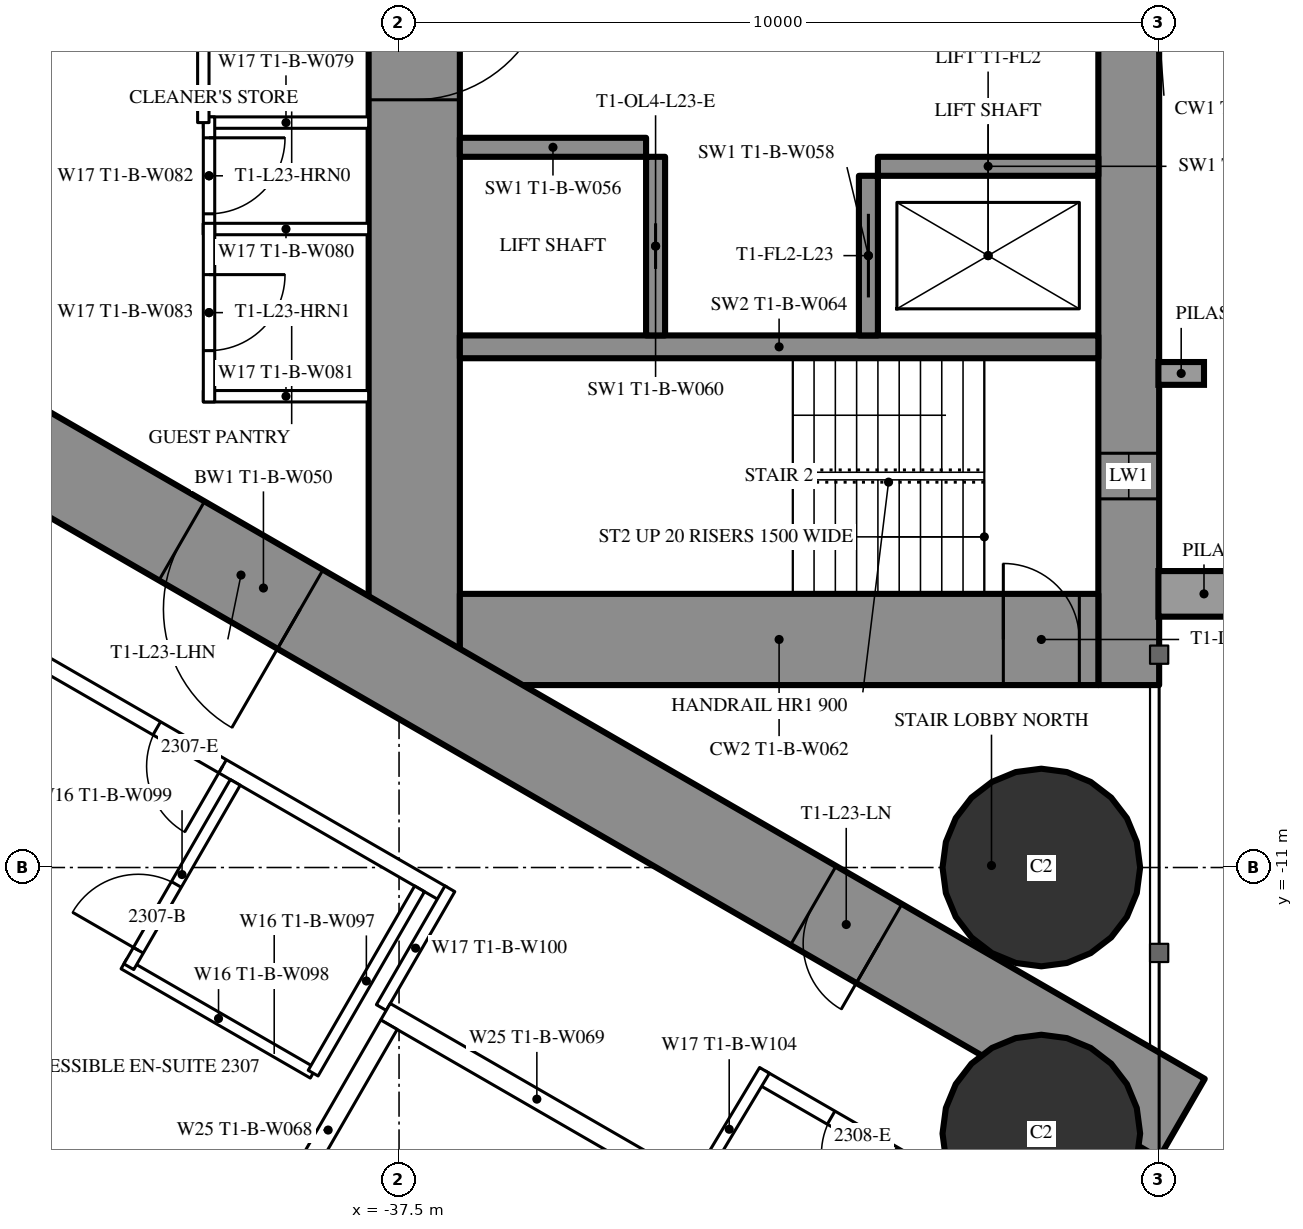
"""IFC4 building model, lengths in metres.
Left out: names, types, materials, properties, quantities, classifications, styles, units other than length and angle.
Written with IfcOpenShell. Run it as: python <this file> out.ifc"""

import sys

from ifc_helpers import new_model, si_unit, direction, frame, frame_2d, origin, origin_2d, place, context, subcontext, project, spatial, rectangle, hollow_circle, extrude, element, fill, save


model = new_model("IFC4")
c1 = context("Model", 3, precision=1e-05, world=origin(), true_north=direction((0.0, 1.0)))
c2 = subcontext(c1, "Body", "Model", "MODEL_VIEW")
j1 = project(units=[si_unit("LENGTHUNIT", "METRE"), si_unit("PLANEANGLEUNIT", "RADIAN")], contexts=[c1])
p1 = place(None, origin())
s1 = spatial("IfcSite", under=j1, at=p1, CompositionType="ELEMENT")
p2 = place(p1, origin())
s2 = spatial("IfcBuilding", under=s1, at=p2, CompositionType="ELEMENT")
p3 = place(p2, frame((0.0, 0.0, 90.6)))
s3 = spatial("IfcBuildingStorey", under=s2, at=p3, CompositionType="ELEMENT", Elevation=90.6)
for number, where, z_axis, x_axis in (
    (1, (-29.05, -11.0, 0.0), (0.0, 0.0, 1.0), (1.0, 0.0, 0.0)),
    (2, (-29.05, -14.5, 0.0), (0.0, 0.0, 1.0), (1.0, 0.0, 0.0)),
):
    element("IfcColumn", number, at=place(p3, frame(where, z_axis=z_axis, x_axis=x_axis)), inside=s3, PredefinedType="COLUMN", context=c2, shape_type="SweptSolid", body=[
        extrude(hollow_circle(Radius=1.3, WallThickness=0.1, at=origin_2d()), origin(), (0.0, 0.0, 1.0), 3.5),
    ])
p4 = place(p3, frame((-27.9, 8.6, 0.0), z_axis=(0.0, 0.0, 1.0), x_axis=(0.0, -1.0, 0.0)))
e3 = element("IfcWall", 3, at=p4, inside=s3, PredefinedType="SHEAR", context=c2, shape_type="SweptSolid", body=[
    extrude(rectangle(XDim=17.2, YDim=0.8, at=frame_2d((8.6, 0.0))), origin(), (0.0, 0.0, 1.0), 3.5),
])
p5 = place(p4, frame((2.45, 0.0, 0.6)))
e4 = element("IfcOpeningElement", 4, at=p5, cuts=e3, PredefinedType="OPENING", context=c2, shape_type="SweptSolid", body=[
    extrude(rectangle(XDim=0.6, YDim=2.1, at=frame_2d((0.3, 1.05))), frame((0.0, 0.41, 0.0), z_axis=(0.0, -1.0, 0.0), x_axis=(1.0, 0.0, 0.0)), (0.0, 0.0, 1.0), 0.82),
])
p6 = place(p4, frame((14.15, 0.0, 0.6)))
e5 = element("IfcOpeningElement", 5, at=p6, cuts=e3, PredefinedType="OPENING", context=c2, shape_type="SweptSolid", body=[
    extrude(rectangle(XDim=0.6, YDim=2.1, at=frame_2d((0.3, 1.05))), frame((0.0, 0.41, 0.0), z_axis=(0.0, -1.0, 0.0), x_axis=(1.0, 0.0, 0.0)), (0.0, 0.0, 1.0), 0.82),
])
p7 = place(p3, frame((-37.3, 8.6, 0.0), z_axis=(0.0, 0.0, 1.0), x_axis=(0.0, -1.0, 0.0)))
e6 = element("IfcWall", 6, at=p7, inside=s3, PredefinedType="SHEAR", context=c2, shape_type="SweptSolid", body=[
    extrude(rectangle(XDim=17.2, YDim=1.2, at=frame_2d((8.6, 0.0))), origin(), (0.0, 0.0, 1.0), 3.5),
])
p8 = place(p7, frame((7.7, 0.0, 0.0)))
e7 = element("IfcOpeningElement", 7, at=p8, cuts=e6, PredefinedType="OPENING", context=c2, shape_type="SweptSolid", body=[
    extrude(rectangle(XDim=1.8, YDim=2.2, at=frame_2d((0.9, 1.1))), frame((0.0, 0.61, 0.0), z_axis=(0.0, -1.0, 0.0), x_axis=(1.0, 0.0, 0.0)), (0.0, 0.0, 1.0), 1.22),
])
p9 = place(p3, frame((-28.3, -8.0, 0.0), z_axis=(0.0, 0.0, 1.0), x_axis=(-1.0, 0.0, 0.0)))
e8 = element("IfcWall", 8, at=p9, inside=s3, PredefinedType="SHEAR", context=c2, shape_type="SweptSolid", body=[
    extrude(rectangle(XDim=8.4, YDim=1.2, at=frame_2d((4.2, 0.0))), origin(), (0.0, 0.0, 1.0), 3.5),
])
p10 = place(p9, frame((0.25, 0.0, 0.0)))
e9 = element("IfcOpeningElement", 9, at=p10, cuts=e8, PredefinedType="OPENING", context=c2, shape_type="SweptSolid", body=[
    extrude(rectangle(XDim=1.0, YDim=2.2, at=frame_2d((0.5, 1.1))), frame((0.0, 0.61, 0.0), z_axis=(0.0, -1.0, 0.0), x_axis=(1.0, 0.0, 0.0)), (0.0, 0.0, 1.0), 1.22),
])
p11 = place(p3, frame((-28.3, -4.15, 0.0), z_axis=(0.0, 0.0, 1.0), x_axis=(-1.0, 0.0, 0.0)))
e10 = element("IfcWall", 10, at=p11, inside=s3, PredefinedType="SHEAR", context=c2, shape_type="SweptSolid", body=[
    extrude(rectangle(XDim=8.4, YDim=0.3, at=frame_2d((4.2, 0.0))), origin(), (0.0, 0.0, 1.0), 3.5),
])
p12 = place(p3, frame((-31.325, -1.9, 0.0), z_axis=(0.0, 0.0, 1.0), x_axis=(0.0, -1.0, 0.0)))
e11 = element("IfcWall", 11, at=p12, inside=s3, PredefinedType="SHEAR", context=c2, shape_type="SweptSolid", body=[
    extrude(rectangle(XDim=2.1, YDim=0.25, at=frame_2d((1.05, 0.0))), origin(), (0.0, 0.0, 1.0), 3.5),
])
p13 = place(p12, frame((0.5, 0.0, 0.0)))
e12 = element("IfcOpeningElement", 12, at=p13, cuts=e11, PredefinedType="OPENING", context=c2, shape_type="SweptSolid", body=[
    extrude(rectangle(XDim=1.1, YDim=2.2, at=frame_2d((0.55, 1.1))), frame((0.0, 0.135, 0.0), z_axis=(0.0, -1.0, 0.0), x_axis=(1.0, 0.0, 0.0)), (0.0, 0.0, 1.0), 0.27),
])
p14 = place(p3, frame((-34.125, -1.65, 0.0), z_axis=(0.0, 0.0, 1.0), x_axis=(0.0, -1.0, 0.0)))
e13 = element("IfcWall", 13, at=p14, inside=s3, PredefinedType="SHEAR", context=c2, shape_type="SweptSolid", body=[
    extrude(rectangle(XDim=2.35, YDim=0.25, at=frame_2d((1.175, 0.0))), origin(), (0.0, 0.0, 1.0), 3.5),
])
p15 = place(p14, frame((0.875, 0.0, 0.0)))
e14 = element("IfcOpeningElement", 14, at=p15, cuts=e13, PredefinedType="OPENING", context=c2, shape_type="SweptSolid", body=[
    extrude(rectangle(XDim=0.6, YDim=2.0, at=frame_2d((0.3, 1.0))), frame((0.0, 0.135, 0.0), z_axis=(0.0, -1.0, 0.0), x_axis=(1.0, 0.0, 0.0)), (0.0, 0.0, 1.0), 0.27),
])
p16 = place(p3, frame((-28.3, -1.775, 0.0), z_axis=(0.0, 0.0, 1.0), x_axis=(-1.0, 0.0, 0.0)))
e15 = element("IfcWall", 15, at=p16, inside=s3, PredefinedType="SHEAR", context=c2, shape_type="SweptSolid", body=[
    extrude(rectangle(XDim=2.9, YDim=0.25, at=frame_2d((1.45, 0.0))), origin(), (0.0, 0.0, 1.0), 3.5),
])
p17 = place(p3, frame((-34.25, -1.525, 0.0), z_axis=(0.0, 0.0, 1.0), x_axis=(-1.0, 0.0, 0.0)))
e16 = element("IfcWall", 16, at=p17, inside=s3, PredefinedType="SHEAR", context=c2, shape_type="SweptSolid", body=[
    extrude(rectangle(XDim=2.45, YDim=0.25, at=frame_2d((1.225, 0.0))), origin(), (0.0, 0.0, 1.0), 3.5),
])
p18 = place(p3, frame((-27.2, 14.3, 0.0), z_axis=(0.0, 0.0, 1.0), x_axis=(-0.866026593062, -0.499997940104, 0.0)))
e17 = element("IfcWall", 17, at=p18, inside=s3, PredefinedType="SHEAR", context=c2, shape_type="SweptSolid", body=[
    extrude(rectangle(XDim=28.946, YDim=1.2, at=frame_2d((14.473, 0.0))), origin(), (0.0, 0.0, 1.0), 3.5),
])
p19 = place(p18, frame((4.6, 0.0, 0.0)))
e18 = element("IfcOpeningElement", 18, at=p19, cuts=e17, PredefinedType="OPENING", context=c2, shape_type="SweptSolid", body=[
    extrude(rectangle(XDim=1.0, YDim=2.2, at=frame_2d((0.5, 1.1))), frame((0.0, 0.61, 0.0), z_axis=(0.0, -1.0, 0.0), x_axis=(1.0, 0.0, 0.0)), (0.0, 0.0, 1.0), 1.22),
])
p20 = place(p18, frame((13.395, 0.0, 0.0)))
e19 = element("IfcOpeningElement", 19, at=p20, cuts=e17, PredefinedType="OPENING", context=c2, shape_type="SweptSolid", body=[
    extrude(rectangle(XDim=1.8, YDim=2.2, at=frame_2d((0.9, 1.1))), frame((0.0, 0.61, 0.0), z_axis=(0.0, -1.0, 0.0), x_axis=(1.0, 0.0, 0.0)), (0.0, 0.0, 1.0), 1.22),
])
p21 = place(p3, frame((-27.2, -14.3, 0.0), z_axis=(0.0, 0.0, 1.0), x_axis=(-0.866024021859, 0.500002393557, 0.0)))
e20 = element("IfcWall", 20, at=p21, inside=s3, PredefinedType="SHEAR", context=c2, shape_type="SweptSolid", body=[
    extrude(rectangle(XDim=27.907, YDim=1.2, at=frame_2d((13.954, 0.0))), origin(), (0.0, 0.0, 1.0), 3.5),
])
p22 = place(p21, frame((4.6, 0.0, 0.0)))
e21 = element("IfcOpeningElement", 21, at=p22, cuts=e20, PredefinedType="OPENING", context=c2, shape_type="SweptSolid", body=[
    extrude(rectangle(XDim=1.0, YDim=2.2, at=frame_2d((0.5, 1.1))), frame((0.0, 0.61, 0.0), z_axis=(0.0, -1.0, 0.0), x_axis=(1.0, 0.0, 0.0)), (0.0, 0.0, 1.0), 1.22),
])
p23 = place(p21, frame((13.395, 0.0, 0.0)))
e22 = element("IfcOpeningElement", 22, at=p23, cuts=e20, PredefinedType="OPENING", context=c2, shape_type="SweptSolid", body=[
    extrude(rectangle(XDim=1.8, YDim=2.2, at=frame_2d((0.9, 1.1))), frame((0.0, 0.61, 0.0), z_axis=(0.0, -1.0, 0.0), x_axis=(1.0, 0.0, 0.0)), (0.0, 0.0, 1.0), 1.22),
])
p24 = place(p3, frame((-27.572, -16.741, 0.0), z_axis=(0.0, 0.0, 1.0), x_axis=(-0.866024464444, 0.500001626982, 0.0)))
e23 = element("IfcWall", 23, at=p24, inside=s3, PredefinedType="PARTITIONING", context=c2, shape_type="SweptSolid", body=[
    extrude(rectangle(XDim=5.955, YDim=0.2, at=frame_2d((2.978, 0.0))), origin(), (0.0, 0.0, 1.0), 3.25),
])
p25 = place(p24, frame((3.95, 0.0, 0.0)))
e24 = element("IfcOpeningElement", 24, at=p25, cuts=e23, PredefinedType="OPENING", context=c2, shape_type="SweptSolid", body=[
    extrude(rectangle(XDim=0.95, YDim=2.2, at=frame_2d((0.475, 1.1))), frame((0.0, 0.11, 0.0), z_axis=(0.0, -1.0, 0.0), x_axis=(1.0, 0.0, 0.0)), (0.0, 0.0, 1.0), 0.22),
])
p26 = place(p3, frame((-36.92, -11.344, 0.0), z_axis=(0.0, 0.0, 1.0), x_axis=(-0.866028313256, 0.499994960614, 0.0)))
e25 = element("IfcWall", 25, at=p26, inside=s3, PredefinedType="PARTITIONING", context=c2, shape_type="SweptSolid", body=[
    extrude(rectangle(XDim=22.568, YDim=0.2, at=frame_2d((11.284, 0.0))), origin(), (0.0, 0.0, 1.0), 3.25),
])
p27 = place(p26, frame((14.481, 0.0, 0.0)))
e26 = element("IfcOpeningElement", 26, at=p27, cuts=e25, PredefinedType="OPENING", context=c2, shape_type="SweptSolid", body=[
    extrude(rectangle(XDim=0.95, YDim=2.2, at=frame_2d((0.475, 1.1))), frame((0.0, 0.11, 0.0), z_axis=(0.0, -1.0, 0.0), x_axis=(1.0, 0.0, 0.0)), (0.0, 0.0, 1.0), 0.22),
])
p28 = place(p26, frame((3.35, 0.0, 0.0)))
e27 = element("IfcOpeningElement", 27, at=p28, cuts=e25, PredefinedType="OPENING", context=c2, shape_type="SweptSolid", body=[
    extrude(rectangle(XDim=1.0, YDim=2.2, at=frame_2d((0.5, 1.1))), frame((0.0, 0.11, 0.0), z_axis=(0.0, -1.0, 0.0), x_axis=(1.0, 0.0, 0.0)), (0.0, 0.0, 1.0), 0.22),
])
p29 = place(p3, frame((-36.831, -11.28, 0.0), z_axis=(0.0, 0.0, 1.0), x_axis=(-0.499937177781, -0.866061671171, 0.0)))
e28 = element("IfcWall", 28, at=p29, inside=s3, PredefinedType="PARTITIONING", context=c2, shape_type="SweptSolid", body=[
    extrude(rectangle(XDim=1.804, YDim=0.15, at=frame_2d((0.902, 0.0))), origin(), (0.0, 0.0, 1.0), 3.25),
])
p30 = place(p3, frame((-33.621, -15.218, 0.0), z_axis=(0.0, 0.0, 1.0), x_axis=(0.514336634837, 0.857588377991, 0.0)))
e29 = element("IfcWall", 29, at=p30, inside=s3, PredefinedType="PARTITIONING", context=c2, shape_type="SweptSolid", body=[
    extrude(rectangle(XDim=1.805, YDim=0.15, at=frame_2d((0.903, 0.0))), origin(), (0.0, 0.0, 1.0), 3.25),
])
p31 = place(p3, frame((-38.63, -13.705, 0.0), z_axis=(0.0, 0.0, 1.0), x_axis=(-0.866018712932, 0.500011588718, 0.0)))
e30 = element("IfcWall", 30, at=p31, inside=s3, PredefinedType="PARTITIONING", context=c2, shape_type="SweptSolid", body=[
    extrude(rectangle(XDim=2.875, YDim=0.15, at=frame_2d((1.438, 0.0))), origin(), (0.0, 0.0, 1.0), 3.25),
])
p32 = place(p3, frame((-39.655, -9.88, 0.0), z_axis=(0.0, 0.0, 1.0), x_axis=(-0.500049511043, -0.865996816683, 0.0)))
e31 = element("IfcWall", 31, at=p32, inside=s3, PredefinedType="PARTITIONING", context=c2, shape_type="SweptSolid", body=[
    extrude(rectangle(XDim=2.8, YDim=0.15, at=frame_2d((1.4, 0.0))), origin(), (0.0, 0.0, 1.0), 3.25),
])
p33 = place(p32, frame((1.55, 0.0, 0.0)))
e32 = element("IfcOpeningElement", 32, at=p33, cuts=e31, PredefinedType="OPENING", context=c2, shape_type="SweptSolid", body=[
    extrude(rectangle(XDim=1.0, YDim=2.2, at=frame_2d((0.5, 1.1))), frame((0.0, 0.085, 0.0), z_axis=(0.0, -1.0, 0.0), x_axis=(1.0, 0.0, 0.0)), (0.0, 0.0, 1.0), 0.17),
])
p34 = place(p3, frame((-37.23, -11.281, 0.0), z_axis=(0.0, 0.0, 1.0), x_axis=(-0.500049511043, -0.865996816683, 0.0)))
e33 = element("IfcWall", 33, at=p34, inside=s3, PredefinedType="PARTITIONING", context=c2, shape_type="SweptSolid", body=[
    extrude(rectangle(XDim=2.8, YDim=0.15, at=frame_2d((1.4, 0.0))), origin(), (0.0, 0.0, 1.0), 3.25),
])
for number, where, z_axis, x_axis in (
    (34, (-37.9, -1.2, 0.0), (0.0, 0.0, 1.0), (-1.0, 0.0, 0.0)),
    (35, (-37.9, -2.6, 0.0), (0.0, 0.0, 1.0), (-1.0, 0.0, 0.0)),
    (36, (-37.9, -4.8, 0.0), (0.0, 0.0, 1.0), (-1.0, 0.0, 0.0)),
):
    element("IfcWall", number, at=place(p3, frame(where, z_axis=z_axis, x_axis=x_axis)), inside=s3, PredefinedType="PARTITIONING", context=c2, shape_type="SweptSolid", body=[
        extrude(rectangle(XDim=2.175, YDim=0.15, at=frame_2d((1.087, 0.0))), origin(), (0.0, 0.0, 1.0), 3.25),
    ])
p35 = place(p3, frame((-40.0, -1.125, 0.0), z_axis=(0.0, 0.0, 1.0), x_axis=(0.0, -1.0, 0.0)))
e37 = element("IfcWall", 37, at=p35, inside=s3, PredefinedType="PARTITIONING", context=c2, shape_type="SweptSolid", body=[
    extrude(rectangle(XDim=1.55, YDim=0.15, at=frame_2d((0.775, 0.0))), origin(), (0.0, 0.0, 1.0), 3.25),
])
p36 = place(p35, frame((0.275, 0.0, 0.0)))
e38 = element("IfcOpeningElement", 38, at=p36, cuts=e37, PredefinedType="OPENING", context=c2, shape_type="SweptSolid", body=[
    extrude(rectangle(XDim=1.0, YDim=2.2, at=frame_2d((0.5, 1.1))), frame((0.0, 0.085, 0.0), z_axis=(0.0, -1.0, 0.0), x_axis=(1.0, 0.0, 0.0)), (0.0, 0.0, 1.0), 0.17),
])
p37 = place(p3, frame((-40.0, -2.525, 0.0), z_axis=(0.0, 0.0, 1.0), x_axis=(0.0, -1.0, 0.0)))
e39 = element("IfcWall", 39, at=p37, inside=s3, PredefinedType="PARTITIONING", context=c2, shape_type="SweptSolid", body=[
    extrude(rectangle(XDim=2.35, YDim=0.15, at=frame_2d((1.175, 0.0))), origin(), (0.0, 0.0, 1.0), 3.25),
])
p38 = place(p37, frame((0.675, 0.0, 0.0)))
e40 = element("IfcOpeningElement", 40, at=p38, cuts=e39, PredefinedType="OPENING", context=c2, shape_type="SweptSolid", body=[
    extrude(rectangle(XDim=1.0, YDim=2.2, at=frame_2d((0.5, 1.1))), frame((0.0, 0.085, 0.0), z_axis=(0.0, -1.0, 0.0), x_axis=(1.0, 0.0, 0.0)), (0.0, 0.0, 1.0), 0.17),
])
p39 = place(p3, frame((-40.075, 6.174, 0.0), z_axis=(0.0, 0.0, 1.0), x_axis=(0.0, -1.0, 0.0)))
e41 = element("IfcWall", 41, at=p39, inside=s3, PredefinedType="PARTITIONING", context=c2, shape_type="SweptSolid", body=[
    extrude(rectangle(XDim=7.374, YDim=0.15, at=frame_2d((3.687, 0.0))), origin(), (0.0, 0.0, 1.0), 3.25),
])
p40 = place(p39, frame((2.787, 0.0, 0.0)))
e42 = element("IfcOpeningElement", 42, at=p40, cuts=e41, PredefinedType="OPENING", context=c2, shape_type="SweptSolid", body=[
    extrude(rectangle(XDim=1.8, YDim=2.2, at=frame_2d((0.9, 1.1))), frame((0.0, 0.085, 0.0), z_axis=(0.0, -1.0, 0.0), x_axis=(1.0, 0.0, 0.0)), (0.0, 0.0, 1.0), 0.17),
])
p41 = place(p3, frame((-33.696, -15.197, 0.0), z_axis=(0.0, 0.0, 1.0), x_axis=(-0.865976953817, 0.500083908417, 0.0)))
e43 = element("IfcWall", 43, at=p41, inside=s3, PredefinedType="PARTITIONING", context=c2, shape_type="SweptSolid", body=[
    extrude(rectangle(XDim=4.599, YDim=0.25, at=frame_2d((2.3, 0.0))), origin(), (0.0, 0.0, 1.0), 3.25),
])
p42 = place(p3, frame((-37.633, -13.068, 0.0), z_axis=(0.0, 0.0, 1.0), x_axis=(-0.499872130319, -0.866099216793, 0.0)))
e44 = element("IfcWall", 44, at=p42, inside=s3, PredefinedType="PARTITIONING", context=c2, shape_type="SweptSolid", body=[
    extrude(rectangle(XDim=3.2, YDim=0.25, at=frame_2d((1.6, 0.0))), origin(), (0.0, 0.0, 1.0), 3.25),
])
p43 = place(p33, origin())
e45 = element("IfcDoor", 45, at=p43, inside=s3, OperationType="SINGLE_SWING_RIGHT", PredefinedType="DOOR", context=c2, shape_type="SweptSolid", body=[
    extrude(rectangle(XDim=1.0, YDim=2.2, at=frame_2d((0.5, 1.1))), frame((0.0, 0.025, 0.0), z_axis=(0.0, -1.0, 0.0), x_axis=(1.0, 0.0, 0.0)), (0.0, 0.0, 1.0), 0.05),
])
fill(e32, e45)
p44 = place(p28, origin())
e46 = element("IfcDoor", 46, at=p44, inside=s3, OperationType="SINGLE_SWING_LEFT", PredefinedType="DOOR", context=c2, shape_type="SweptSolid", body=[
    extrude(rectangle(XDim=1.0, YDim=2.2, at=frame_2d((0.5, 1.1))), frame((0.0, 0.025, 0.0), z_axis=(0.0, -1.0, 0.0), x_axis=(1.0, 0.0, 0.0)), (0.0, 0.0, 1.0), 0.05),
])
fill(e27, e46)
p45 = place(p25, origin())
e47 = element("IfcDoor", 47, at=p45, inside=s3, OperationType="SINGLE_SWING_LEFT", PredefinedType="DOOR", context=c2, shape_type="SweptSolid", body=[
    extrude(rectangle(XDim=0.95, YDim=2.2, at=frame_2d((0.475, 1.1))), frame((0.0, 0.025, 0.0), z_axis=(0.0, -1.0, 0.0), x_axis=(1.0, 0.0, 0.0)), (0.0, 0.0, 1.0), 0.05),
])
fill(e24, e47)
p46 = place(p36, origin())
e48 = element("IfcDoor", 48, at=p46, inside=s3, OperationType="SINGLE_SWING_LEFT", PredefinedType="DOOR", context=c2, shape_type="SweptSolid", body=[
    extrude(rectangle(XDim=1.0, YDim=2.2, at=frame_2d((0.5, 1.1))), frame((0.0, 0.025, 0.0), z_axis=(0.0, -1.0, 0.0), x_axis=(1.0, 0.0, 0.0)), (0.0, 0.0, 1.0), 0.05),
])
fill(e38, e48)
p47 = place(p38, origin())
e49 = element("IfcDoor", 49, at=p47, inside=s3, OperationType="SINGLE_SWING_LEFT", PredefinedType="DOOR", context=c2, shape_type="SweptSolid", body=[
    extrude(rectangle(XDim=1.0, YDim=2.2, at=frame_2d((0.5, 1.1))), frame((0.0, 0.025, 0.0), z_axis=(0.0, -1.0, 0.0), x_axis=(1.0, 0.0, 0.0)), (0.0, 0.0, 1.0), 0.05),
])
fill(e40, e49)
p48 = place(p22, origin())
e50 = element("IfcDoor", 50, at=p48, inside=s3, OperationType="SINGLE_SWING_LEFT", PredefinedType="DOOR", context=c2, shape_type="SweptSolid", body=[
    extrude(rectangle(XDim=1.0, YDim=2.2, at=frame_2d((0.5, 1.1))), frame((0.0, 0.025, 0.0), z_axis=(0.0, -1.0, 0.0), x_axis=(1.0, 0.0, 0.0)), (0.0, 0.0, 1.0), 0.05),
])
fill(e21, e50)
p49 = place(p23, origin())
e51 = element("IfcDoor", 51, at=p49, inside=s3, OperationType="DOUBLE_DOOR_SINGLE_SWING", PredefinedType="DOOR", context=c2, shape_type="SweptSolid", body=[
    extrude(rectangle(XDim=1.8, YDim=2.2, at=frame_2d((0.9, 1.1))), frame((0.0, 0.025, 0.0), z_axis=(0.0, -1.0, 0.0), x_axis=(1.0, 0.0, 0.0)), (0.0, 0.0, 1.0), 0.05),
])
fill(e22, e51)
p50 = place(p8, origin())
e52 = element("IfcDoor", 52, at=p50, inside=s3, OperationType="DOUBLE_DOOR_SINGLE_SWING", PredefinedType="DOOR", context=c2, shape_type="SweptSolid", body=[
    extrude(rectangle(XDim=1.8, YDim=2.2, at=frame_2d((0.9, 1.1))), frame((0.0, 0.025, 0.0), z_axis=(0.0, -1.0, 0.0), x_axis=(1.0, 0.0, 0.0)), (0.0, 0.0, 1.0), 0.05),
])
fill(e7, e52)
p51 = place(p10, origin())
e53 = element("IfcDoor", 53, at=p51, inside=s3, OperationType="SINGLE_SWING_RIGHT", PredefinedType="DOOR", context=c2, shape_type="SweptSolid", body=[
    extrude(rectangle(XDim=1.0, YDim=2.2, at=frame_2d((0.5, 1.1))), frame((0.0, 0.025, 0.0), z_axis=(0.0, -1.0, 0.0), x_axis=(1.0, 0.0, 0.0)), (0.0, 0.0, 1.0), 0.05),
])
fill(e9, e53)
p52 = place(p13, origin())
e54 = element("IfcDoor", 54, at=p52, inside=s3, OperationType="SLIDING_TO_LEFT", PredefinedType="USERDEFINED", context=c2, shape_type="SweptSolid", body=[
    extrude(rectangle(XDim=1.1, YDim=2.2, at=frame_2d((0.55, 1.1))), frame((0.0, 0.025, 0.0), z_axis=(0.0, -1.0, 0.0), x_axis=(1.0, 0.0, 0.0)), (0.0, 0.0, 1.0), 0.05),
])
fill(e12, e54)
p53 = place(p15, origin())
e55 = element("IfcDoor", 55, at=p53, inside=s3, OperationType="SLIDING_TO_LEFT", PredefinedType="DOOR", context=c2, shape_type="SweptSolid", body=[
    extrude(rectangle(XDim=0.6, YDim=2.0, at=frame_2d((0.3, 1.0))), frame((0.0, 0.025, 0.0), z_axis=(0.0, -1.0, 0.0), x_axis=(1.0, 0.0, 0.0)), (0.0, 0.0, 1.0), 0.05),
])
fill(e14, e55)
p54 = place(p6, origin())
e56 = element("IfcWindow", 56, at=p54, inside=s3, PartitioningType="SINGLE_PANEL", PredefinedType="WINDOW", context=c2, shape_type="SweptSolid", body=[
    extrude(rectangle(XDim=0.6, YDim=2.1, at=frame_2d((0.3, 1.05))), frame((0.0, 0.03, 0.0), z_axis=(0.0, -1.0, 0.0), x_axis=(1.0, 0.0, 0.0)), (0.0, 0.0, 1.0), 0.06),
])
fill(e5, e56)
save(model, sys.argv[1])
